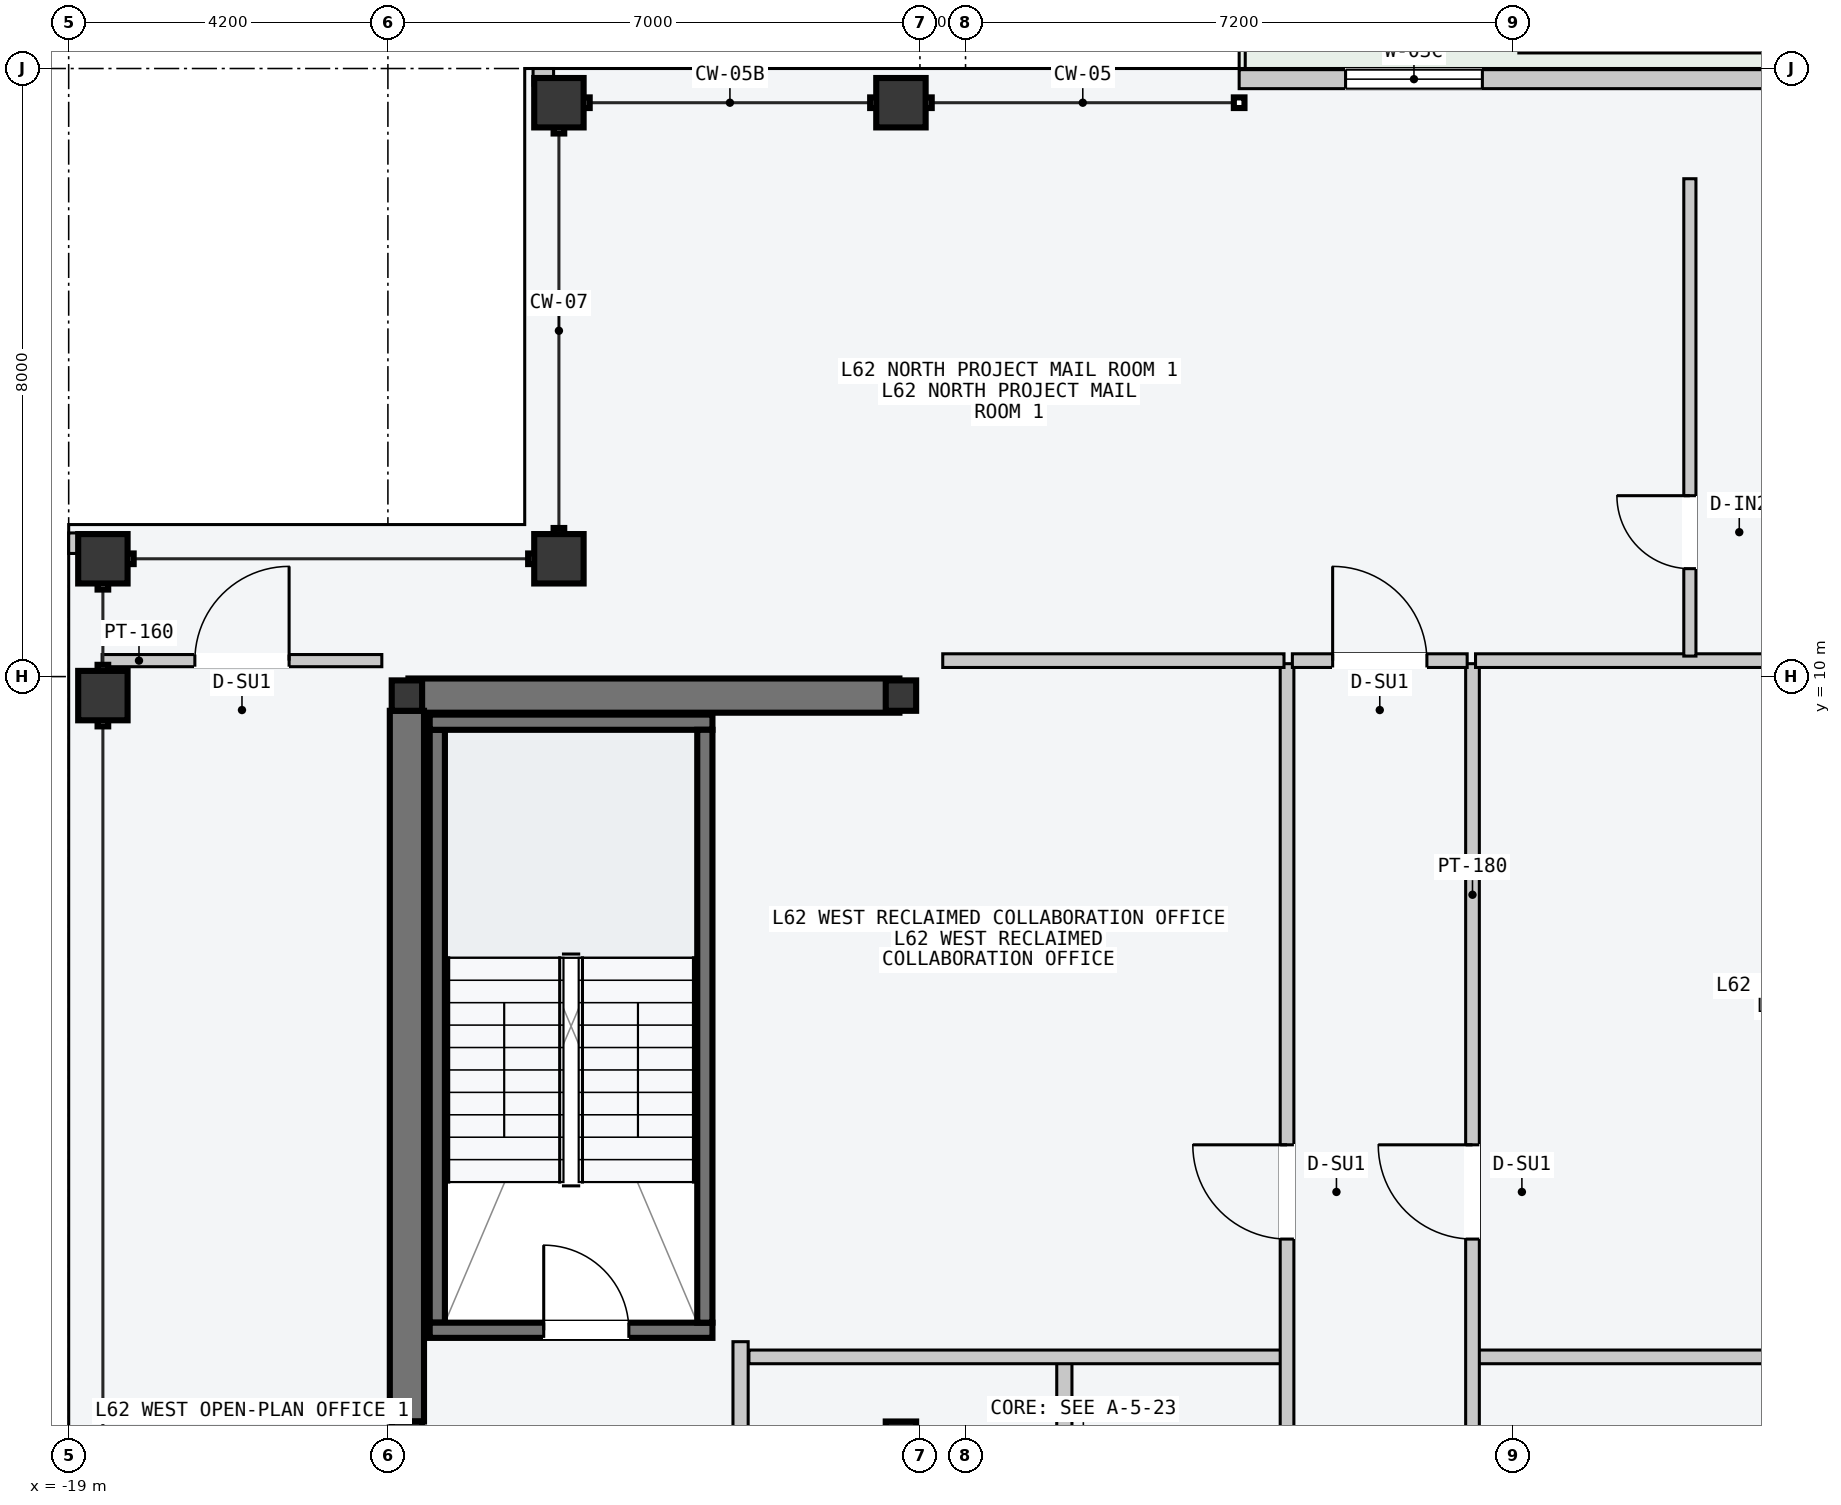
"""IFC4 building model, lengths in metres.
Left out: names, types, materials, properties, quantities, classifications, styles, units other than length and angle.
Written with IfcOpenShell. Run it as: python <this file> out.ifc"""

import sys

from ifc_helpers import new_model, si_unit, direction, frame, frame_2d, origin, origin_2d, place, context, subcontext, project, spatial, rectangle, hollow_rectangle, i_section, extrude, element, fill, save


model = new_model("IFC4")
c1 = context("Model", 3, precision=1e-05, world=origin(), true_north=direction((0.0, 1.0)))
c2 = subcontext(c1, "Body", "Model", "MODEL_VIEW")
j1 = project(units=[si_unit("LENGTHUNIT", "METRE"), si_unit("PLANEANGLEUNIT", "RADIAN")], contexts=[c1])
p1 = place(None, origin())
s1 = spatial("IfcSite", under=j1, at=p1, CompositionType="ELEMENT")
p2 = place(p1, origin())
s2 = spatial("IfcBuilding", under=s1, at=p2, CompositionType="ELEMENT")
p3 = place(p2, frame((0.0, 0.0, 236.4)))
s3 = spatial("IfcBuildingStorey", under=s2, at=p3, CompositionType="ELEMENT", Elevation=236.4)
p4 = place(p3, frame((-14.53, 9.75, -0.2), z_axis=(0.0, 0.0, 1.0), x_axis=(1.0, 0.0, 0.0)))
e1 = element("IfcWall", 1, at=p4, inside=s3, PredefinedType="SHEAR", context=c2, shape_type="SweptSolid", body=[
    extrude(rectangle(XDim=6.46, YDim=0.45, at=frame_2d((3.23, 0.0))), origin(), (0.0, 0.0, 1.0), 3.6),
])
p5 = place(p3, frame((-14.55, 0.2, -0.2), z_axis=(0.0, 0.0, 1.0), x_axis=(0.0, 1.0, 0.0)))
e2 = element("IfcWall", 2, at=p5, inside=s3, PredefinedType="SHEAR", context=c2, shape_type="SweptSolid", body=[
    extrude(rectangle(XDim=9.35, YDim=0.45, at=frame_2d((4.675, 0.0))), origin(), (0.0, 0.0, 1.0), 3.6),
])
p6 = place(p3, frame((-14.15, 1.5, -0.2), z_axis=(0.0, 0.0, 1.0), x_axis=(0.0, 1.0, 0.0)))
e3 = element("IfcWall", 3, at=p6, inside=s3, PredefinedType="SOLIDWALL", context=c2, shape_type="SweptSolid", body=[
    extrude(rectangle(XDim=7.8, YDim=0.2, at=frame_2d((3.9, 0.0))), origin(), (0.0, 0.0, 1.0), 3.6),
])
p7 = place(p3, frame((-14.25, 1.4, -0.2), z_axis=(0.0, 0.0, 1.0), x_axis=(1.0, 0.0, 0.0)))
e4 = element("IfcWall", 4, at=p7, inside=s3, PredefinedType="SOLIDWALL", context=c2, shape_type="SweptSolid", body=[
    extrude(rectangle(XDim=3.72, YDim=0.2, at=frame_2d((1.86, 0.0))), origin(), (0.0, 0.0, 1.0), 3.6),
])
p8 = place(p7, frame((1.5, 0.0, 0.2)))
e5 = element("IfcOpeningElement", 5, at=p8, cuts=e4, PredefinedType="OPENING", context=c2, shape_type="SweptSolid", body=[
    extrude(rectangle(XDim=1.12, YDim=2.18, at=frame_2d((0.56, 1.09))), frame((0.0, 0.11, 0.0), z_axis=(0.0, -1.0, 0.0), x_axis=(1.0, 0.0, 0.0)), (0.0, 0.0, 1.0), 0.22),
])
p9 = place(p3, frame((-14.25, 9.4, -0.2), z_axis=(0.0, 0.0, 1.0), x_axis=(1.0, 0.0, 0.0)))
e6 = element("IfcWall", 6, at=p9, inside=s3, PredefinedType="SOLIDWALL", context=c2, shape_type="SweptSolid", body=[
    extrude(rectangle(XDim=3.72, YDim=0.2, at=frame_2d((1.86, 0.0))), origin(), (0.0, 0.0, 1.0), 3.6),
])
p10 = place(p3, frame((-10.63, 1.5, -0.2), z_axis=(0.0, 0.0, 1.0), x_axis=(0.0, 1.0, 0.0)))
e7 = element("IfcWall", 7, at=p10, inside=s3, PredefinedType="SOLIDWALL", context=c2, shape_type="SweptSolid", body=[
    extrude(rectangle(XDim=7.8, YDim=0.2, at=frame_2d((3.9, 0.0))), origin(), (0.0, 0.0, 1.0), 3.6),
])
for number, where, z_axis, x_axis in (
    (8, (-14.55, 0.0, 0.0), (0.0, 0.0, 1.0), (1.0, 0.0, 0.0)),
    (9, (-14.55, 9.75, 0.0), (0.0, 0.0, 1.0), (1.0, 0.0, 0.0)),
    (10, (-8.05, 0.0, 0.0), (0.0, 0.0, 1.0), (1.0, 0.0, 0.0)),
    (11, (-8.05, 9.75, 0.0), (0.0, 0.0, 1.0), (1.0, 0.0, 0.0)),
):
    element("IfcColumn", number, at=place(p3, frame(where, z_axis=z_axis, x_axis=x_axis)), inside=s3, PredefinedType="COLUMN", context=c2, shape_type="SweptSolid", body=[
        extrude(i_section(OverallWidth=0.4, OverallDepth=0.4, WebThickness=0.013, FlangeThickness=0.021, at=origin_2d()), origin(), (0.0, 0.0, 1.0), 3.6),
    ])
for number, where, z_axis, x_axis in (
    (12, (-12.55, 17.55, 0.0), (0.0, 0.0, 1.0), (1.0, 0.0, 0.0)),
    (13, (-8.05, 17.55, 0.0), (0.0, 0.0, 1.0), (1.0, 0.0, 0.0)),
    (14, (-18.55, 9.75, 0.0), (0.0, 0.0, 1.0), (0.0, 1.0, 0.0)),
    (15, (-18.55, 11.55, 0.0), (0.0, 0.0, 1.0), (0.0, 1.0, 0.0)),
    (16, (-12.55, 11.55, 0.0), (0.0, 0.0, 1.0), (1.0, 0.0, 0.0)),
):
    element("IfcColumn", number, at=place(p3, frame(where, z_axis=z_axis, x_axis=x_axis)), inside=s3, PredefinedType="COLUMN", context=c2, shape_type="SweptSolid", body=[
        extrude(hollow_rectangle(XDim=0.65, YDim=0.65, WallThickness=0.028, at=origin_2d()), origin(), (0.0, 0.0, 1.0), 3.6),
    ])
p11 = place(p3, frame((-3.6, 17.86, 0.0), z_axis=(0.0, 0.0, 1.0), x_axis=(1.0, 0.0, 0.0)))
e17 = element("IfcWall", 17, at=p11, inside=s3, PredefinedType="STANDARD", context=c2, shape_type="SweptSolid", body=[
    extrude(rectangle(XDim=10.8, YDim=0.25, at=frame_2d((5.4, 0.0))), origin(), (0.0, 0.0, 1.0), 3.4),
])
p12 = place(p11, frame((7.4, 0.0, 0.0)))
e18 = element("IfcOpeningElement", 18, at=p12, cuts=e17, PredefinedType="OPENING", context=c2, shape_type="SweptSolid", body=[
    extrude(rectangle(XDim=1.6, YDim=2.2, at=frame_2d((0.8, 1.1))), frame((0.0, 0.135, 0.0), z_axis=(0.0, -1.0, 0.0), x_axis=(1.0, 0.0, 0.0)), (0.0, 0.0, 1.0), 0.27),
])
p13 = place(p11, frame((1.4, 0.0, 0.85)))
e19 = element("IfcOpeningElement", 19, at=p13, cuts=e17, PredefinedType="OPENING", context=c2, shape_type="SweptSolid", body=[
    extrude(rectangle(XDim=1.8, YDim=2.05, at=frame_2d((0.9, 1.025))), frame((0.0, 0.135, 0.0), z_axis=(0.0, -1.0, 0.0), x_axis=(1.0, 0.0, 0.0)), (0.0, 0.0, 1.0), 0.27),
])
for number, where, z_axis, x_axis in (
    (20, (-12.89, 17.89, 0.0), (0.0, 0.0, 1.0), (1.0, 0.0, 0.0)),
    (21, (-18.89, 11.62, 0.0), (0.0, 0.0, 1.0), (0.0, 1.0, 0.0)),
):
    element("IfcWall", number, at=place(p3, frame(where, z_axis=z_axis, x_axis=x_axis)), inside=s3, PredefinedType="PARAPET", context=c2, shape_type="SweptSolid", body=[
        extrude(rectangle(XDim=0.27, YDim=0.22, at=frame_2d((0.135, 0.0))), origin(), (0.0, 0.0, 1.0), 1.2),
    ])
p14 = place(p3, frame((-5.9, -9.45, 0.0), z_axis=(0.0, 0.0, 1.0), x_axis=(0.0, 1.0, 0.0)))
e22 = element("IfcWall", 22, at=p14, inside=s3, PredefinedType="PARTITIONING", context=c2, shape_type="SweptSolid", body=[
    extrude(rectangle(XDim=10.5, YDim=0.2, at=frame_2d((5.25, 0.0))), origin(), (0.0, 0.0, 1.0), 3.4),
])
p15 = place(p14, frame((3.9, 0.0, 0.0)))
e23 = element("IfcOpeningElement", 23, at=p15, cuts=e22, PredefinedType="OPENING", context=c2, shape_type="SweptSolid", body=[
    extrude(rectangle(XDim=1.5, YDim=2.2, at=frame_2d((0.75, 1.1))), frame((0.0, 0.11, 0.0), z_axis=(0.0, -1.0, 0.0), x_axis=(1.0, 0.0, 0.0)), (0.0, 0.0, 1.0), 0.22),
])
p16 = place(p3, frame((-10.16, -2.55, 0.0), z_axis=(0.0, 0.0, 1.0), x_axis=(0.0, 1.0, 0.0)))
e24 = element("IfcWall", 24, at=p16, inside=s3, PredefinedType="PARTITIONING", context=c2, shape_type="SweptSolid", body=[
    extrude(rectangle(XDim=3.8, YDim=0.2, at=frame_2d((1.9, 0.0))), origin(), (0.0, 0.0, 1.0), 3.4),
])
p17 = place(p16, frame((1.3, 0.0, 0.0)))
e25 = element("IfcOpeningElement", 25, at=p17, cuts=e24, PredefinedType="OPENING", context=c2, shape_type="SweptSolid", body=[
    extrude(rectangle(XDim=1.1, YDim=2.15, at=frame_2d((0.55, 1.075))), frame((0.0, 0.11, 0.0), z_axis=(0.0, -1.0, 0.0), x_axis=(1.0, 0.0, 0.0)), (0.0, 0.0, 1.0), 0.22),
])
p18 = place(p3, frame((-10.05, 1.05, 0.0), z_axis=(0.0, 0.0, 1.0), x_axis=(1.0, 0.0, 0.0)))
e26 = element("IfcWall", 26, at=p18, inside=s3, PredefinedType="PARTITIONING", context=c2, shape_type="SweptSolid", body=[
    extrude(rectangle(XDim=7.04, YDim=0.18, at=frame_2d((3.52, 0.0))), origin(), (0.0, 0.0, 1.0), 3.4),
])
p19 = place(p3, frame((-2.97, -3.5, 0.0), z_axis=(0.0, 0.0, 1.0), x_axis=(0.0, 1.0, 0.0)))
e27 = element("IfcWall", 27, at=p19, inside=s3, PredefinedType="PARTITIONING", context=c2, shape_type="SweptSolid", body=[
    extrude(rectangle(XDim=13.67, YDim=0.18, at=frame_2d((6.835, 0.0))), origin(), (0.0, 0.0, 1.0), 3.4),
])
p20 = place(p19, frame((6.1, 0.0, 0.0)))
e28 = element("IfcOpeningElement", 28, at=p20, cuts=e27, PredefinedType="OPENING", context=c2, shape_type="SweptSolid", body=[
    extrude(rectangle(XDim=1.24, YDim=2.24, at=frame_2d((0.62, 1.12))), frame((0.0, 0.1, 0.0), z_axis=(0.0, -1.0, 0.0), x_axis=(1.0, 0.0, 0.0)), (0.0, 0.0, 1.0), 0.2),
])
p21 = place(p19, frame((1.6, 0.0, 0.0)))
e29 = element("IfcOpeningElement", 29, at=p21, cuts=e27, PredefinedType="OPENING", context=c2, shape_type="SweptSolid", body=[
    extrude(rectangle(XDim=0.96, YDim=2.18, at=frame_2d((0.48, 1.09))), frame((0.0, 0.1, 0.0), z_axis=(0.0, -1.0, 0.0), x_axis=(1.0, 0.0, 0.0)), (0.0, 0.0, 1.0), 0.2),
])
p22 = place(p3, frame((-7.5, 10.21, 0.0), z_axis=(0.0, 0.0, 1.0), x_axis=(1.0, 0.0, 0.0)))
e30 = element("IfcWall", 30, at=p22, inside=s3, PredefinedType="PARTITIONING", context=c2, shape_type="SweptSolid", body=[
    extrude(rectangle(XDim=4.49, YDim=0.18, at=frame_2d((2.245, 0.0))), origin(), (0.0, 0.0, 1.0), 3.4),
])
p23 = place(p3, frame((-0.49, 1.05, 0.0), z_axis=(0.0, 0.0, 1.0), x_axis=(1.0, 0.0, 0.0)))
e31 = element("IfcWall", 31, at=p23, inside=s3, PredefinedType="PARTITIONING", context=c2, shape_type="SweptSolid", body=[
    extrude(rectangle(XDim=10.55, YDim=0.18, at=frame_2d((5.275, 0.0))), origin(), (0.0, 0.0, 1.0), 3.4),
])
p24 = place(p3, frame((-0.53, -3.5, 0.0), z_axis=(0.0, 0.0, 1.0), x_axis=(0.0, 1.0, 0.0)))
e32 = element("IfcWall", 32, at=p24, inside=s3, PredefinedType="PARTITIONING", context=c2, shape_type="SweptSolid", body=[
    extrude(rectangle(XDim=13.67, YDim=0.18, at=frame_2d((6.835, 0.0))), origin(), (0.0, 0.0, 1.0), 3.4),
])
p25 = place(p24, frame((6.1, 0.0, 0.0)))
e33 = element("IfcOpeningElement", 33, at=p25, cuts=e32, PredefinedType="OPENING", context=c2, shape_type="SweptSolid", body=[
    extrude(rectangle(XDim=1.24, YDim=2.24, at=frame_2d((0.62, 1.12))), frame((0.0, 0.1, 0.0), z_axis=(0.0, -1.0, 0.0), x_axis=(1.0, 0.0, 0.0)), (0.0, 0.0, 1.0), 0.2),
])
p26 = place(p24, frame((1.6, 0.0, 0.0)))
e34 = element("IfcOpeningElement", 34, at=p26, cuts=e32, PredefinedType="OPENING", context=c2, shape_type="SweptSolid", body=[
    extrude(rectangle(XDim=0.96, YDim=2.18, at=frame_2d((0.48, 1.09))), frame((0.0, 0.1, 0.0), z_axis=(0.0, -1.0, 0.0), x_axis=(1.0, 0.0, 0.0)), (0.0, 0.0, 1.0), 0.2),
])
p27 = place(p3, frame((-0.49, 10.21, 0.0), z_axis=(0.0, 0.0, 1.0), x_axis=(1.0, 0.0, 0.0)))
e35 = element("IfcWall", 35, at=p27, inside=s3, PredefinedType="PARTITIONING", context=c2, shape_type="SweptSolid", body=[
    extrude(rectangle(XDim=7.99, YDim=0.18, at=frame_2d((3.995, 0.0))), origin(), (0.0, 0.0, 1.0), 3.4),
])
p28 = place(p3, frame((2.33, 10.27, 0.0), z_axis=(0.0, 0.0, 1.0), x_axis=(0.0, 1.0, 0.0)))
e36 = element("IfcWall", 36, at=p28, inside=s3, PredefinedType="PARTITIONING", context=c2, shape_type="SweptSolid", body=[
    extrude(rectangle(XDim=6.28, YDim=0.16, at=frame_2d((3.14, 0.0))), origin(), (0.0, 0.0, 1.0), 3.4),
])
p29 = place(p28, frame((1.15, 0.0, 0.0)))
e37 = element("IfcOpeningElement", 37, at=p29, cuts=e36, PredefinedType="OPENING", context=c2, shape_type="SweptSolid", body=[
    extrude(rectangle(XDim=0.96, YDim=2.18, at=frame_2d((0.48, 1.09))), frame((0.0, 0.09, 0.0), z_axis=(0.0, -1.0, 0.0), x_axis=(1.0, 0.0, 0.0)), (0.0, 0.0, 1.0), 0.18),
])
p30 = place(p3, frame((-2.9, 10.21, 0.0), z_axis=(0.0, 0.0, 1.0), x_axis=(1.0, 0.0, 0.0)))
e38 = element("IfcWall", 38, at=p30, inside=s3, PredefinedType="PARTITIONING", context=c2, shape_type="SweptSolid", body=[
    extrude(rectangle(XDim=2.3, YDim=0.18, at=frame_2d((1.15, 0.0))), origin(), (0.0, 0.0, 1.0), 3.4),
])
p31 = place(p30, frame((0.53, 0.0, 0.0)))
e39 = element("IfcOpeningElement", 39, at=p31, cuts=e38, PredefinedType="OPENING", context=c2, shape_type="SweptSolid", body=[
    extrude(rectangle(XDim=1.24, YDim=2.24, at=frame_2d((0.62, 1.12))), frame((0.0, 0.1, 0.0), z_axis=(0.0, -1.0, 0.0), x_axis=(1.0, 0.0, 0.0)), (0.0, 0.0, 1.0), 0.2),
])
p32 = place(p3, frame((-18.56, 10.21, 0.0), z_axis=(0.0, 0.0, 1.0), x_axis=(1.0, 0.0, 0.0)))
e40 = element("IfcWall", 40, at=p32, inside=s3, PredefinedType="PARTITIONING", context=c2, shape_type="SweptSolid", body=[
    extrude(rectangle(XDim=3.68, YDim=0.16, at=frame_2d((1.84, 0.0))), origin(), (0.0, 0.0, 1.0), 3.4),
])
p33 = place(p32, frame((1.22, 0.0, 0.0)))
e41 = element("IfcOpeningElement", 41, at=p33, cuts=e40, PredefinedType="OPENING", context=c2, shape_type="SweptSolid", body=[
    extrude(rectangle(XDim=1.24, YDim=2.24, at=frame_2d((0.62, 1.12))), frame((0.0, 0.09, 0.0), z_axis=(0.0, -1.0, 0.0), x_axis=(1.0, 0.0, 0.0)), (0.0, 0.0, 1.0), 0.18),
])
p34 = place(p8, origin())
e42 = element("IfcDoor", 42, at=p34, inside=s3, OperationType="SINGLE_SWING_LEFT", PredefinedType="DOOR", context=c2, shape_type="SweptSolid", body=[
    extrude(rectangle(XDim=1.12, YDim=2.18, at=frame_2d((0.56, 1.09))), frame((0.0, 0.025, 0.0), z_axis=(0.0, -1.0, 0.0), x_axis=(1.0, 0.0, 0.0)), (0.0, 0.0, 1.0), 0.05),
])
fill(e5, e42)
p35 = place(p13, origin())
e43 = element("IfcWindow", 43, at=p35, inside=s3, PartitioningType="SINGLE_PANEL", PredefinedType="WINDOW", context=c2, shape_type="SweptSolid", body=[
    extrude(rectangle(XDim=1.8, YDim=2.05, at=frame_2d((0.9, 1.025))), frame((0.0, 0.03, 0.0), z_axis=(0.0, -1.0, 0.0), x_axis=(1.0, 0.0, 0.0)), (0.0, 0.0, 1.0), 0.06),
])
fill(e19, e43)
p36 = place(p20, origin())
e44 = element("IfcDoor", 44, at=p36, inside=s3, OperationType="SINGLE_SWING_RIGHT", PredefinedType="DOOR", context=c2, shape_type="SweptSolid", body=[
    extrude(rectangle(XDim=1.24, YDim=2.24, at=frame_2d((0.62, 1.12))), frame((0.0, 0.025, 0.0), z_axis=(0.0, -1.0, 0.0), x_axis=(1.0, 0.0, 0.0)), (0.0, 0.0, 1.0), 0.05),
])
fill(e28, e44)
p37 = place(p25, origin())
e45 = element("IfcDoor", 45, at=p37, inside=s3, OperationType="SINGLE_SWING_RIGHT", PredefinedType="DOOR", context=c2, shape_type="SweptSolid", body=[
    extrude(rectangle(XDim=1.24, YDim=2.24, at=frame_2d((0.62, 1.12))), frame((0.0, 0.025, 0.0), z_axis=(0.0, -1.0, 0.0), x_axis=(1.0, 0.0, 0.0)), (0.0, 0.0, 1.0), 0.05),
])
fill(e33, e45)
p38 = place(p29, origin())
e46 = element("IfcDoor", 46, at=p38, inside=s3, OperationType="SINGLE_SWING_RIGHT", PredefinedType="DOOR", context=c2, shape_type="SweptSolid", body=[
    extrude(rectangle(XDim=0.96, YDim=2.18, at=frame_2d((0.48, 1.09))), frame((0.0, 0.025, 0.0), z_axis=(0.0, -1.0, 0.0), x_axis=(1.0, 0.0, 0.0)), (0.0, 0.0, 1.0), 0.05),
])
fill(e37, e46)
p39 = place(p31, origin())
e47 = element("IfcDoor", 47, at=p39, inside=s3, OperationType="SINGLE_SWING_LEFT", PredefinedType="DOOR", context=c2, shape_type="SweptSolid", body=[
    extrude(rectangle(XDim=1.24, YDim=2.24, at=frame_2d((0.62, 1.12))), frame((0.0, 0.025, 0.0), z_axis=(0.0, -1.0, 0.0), x_axis=(1.0, 0.0, 0.0)), (0.0, 0.0, 1.0), 0.05),
])
fill(e39, e47)
p40 = place(p33, origin())
e48 = element("IfcDoor", 48, at=p40, inside=s3, OperationType="SINGLE_SWING_RIGHT", PredefinedType="DOOR", context=c2, shape_type="SweptSolid", body=[
    extrude(rectangle(XDim=1.24, YDim=2.24, at=frame_2d((0.62, 1.12))), frame((0.0, 0.025, 0.0), z_axis=(0.0, -1.0, 0.0), x_axis=(1.0, 0.0, 0.0)), (0.0, 0.0, 1.0), 0.05),
])
fill(e41, e48)
save(model, sys.argv[1])
